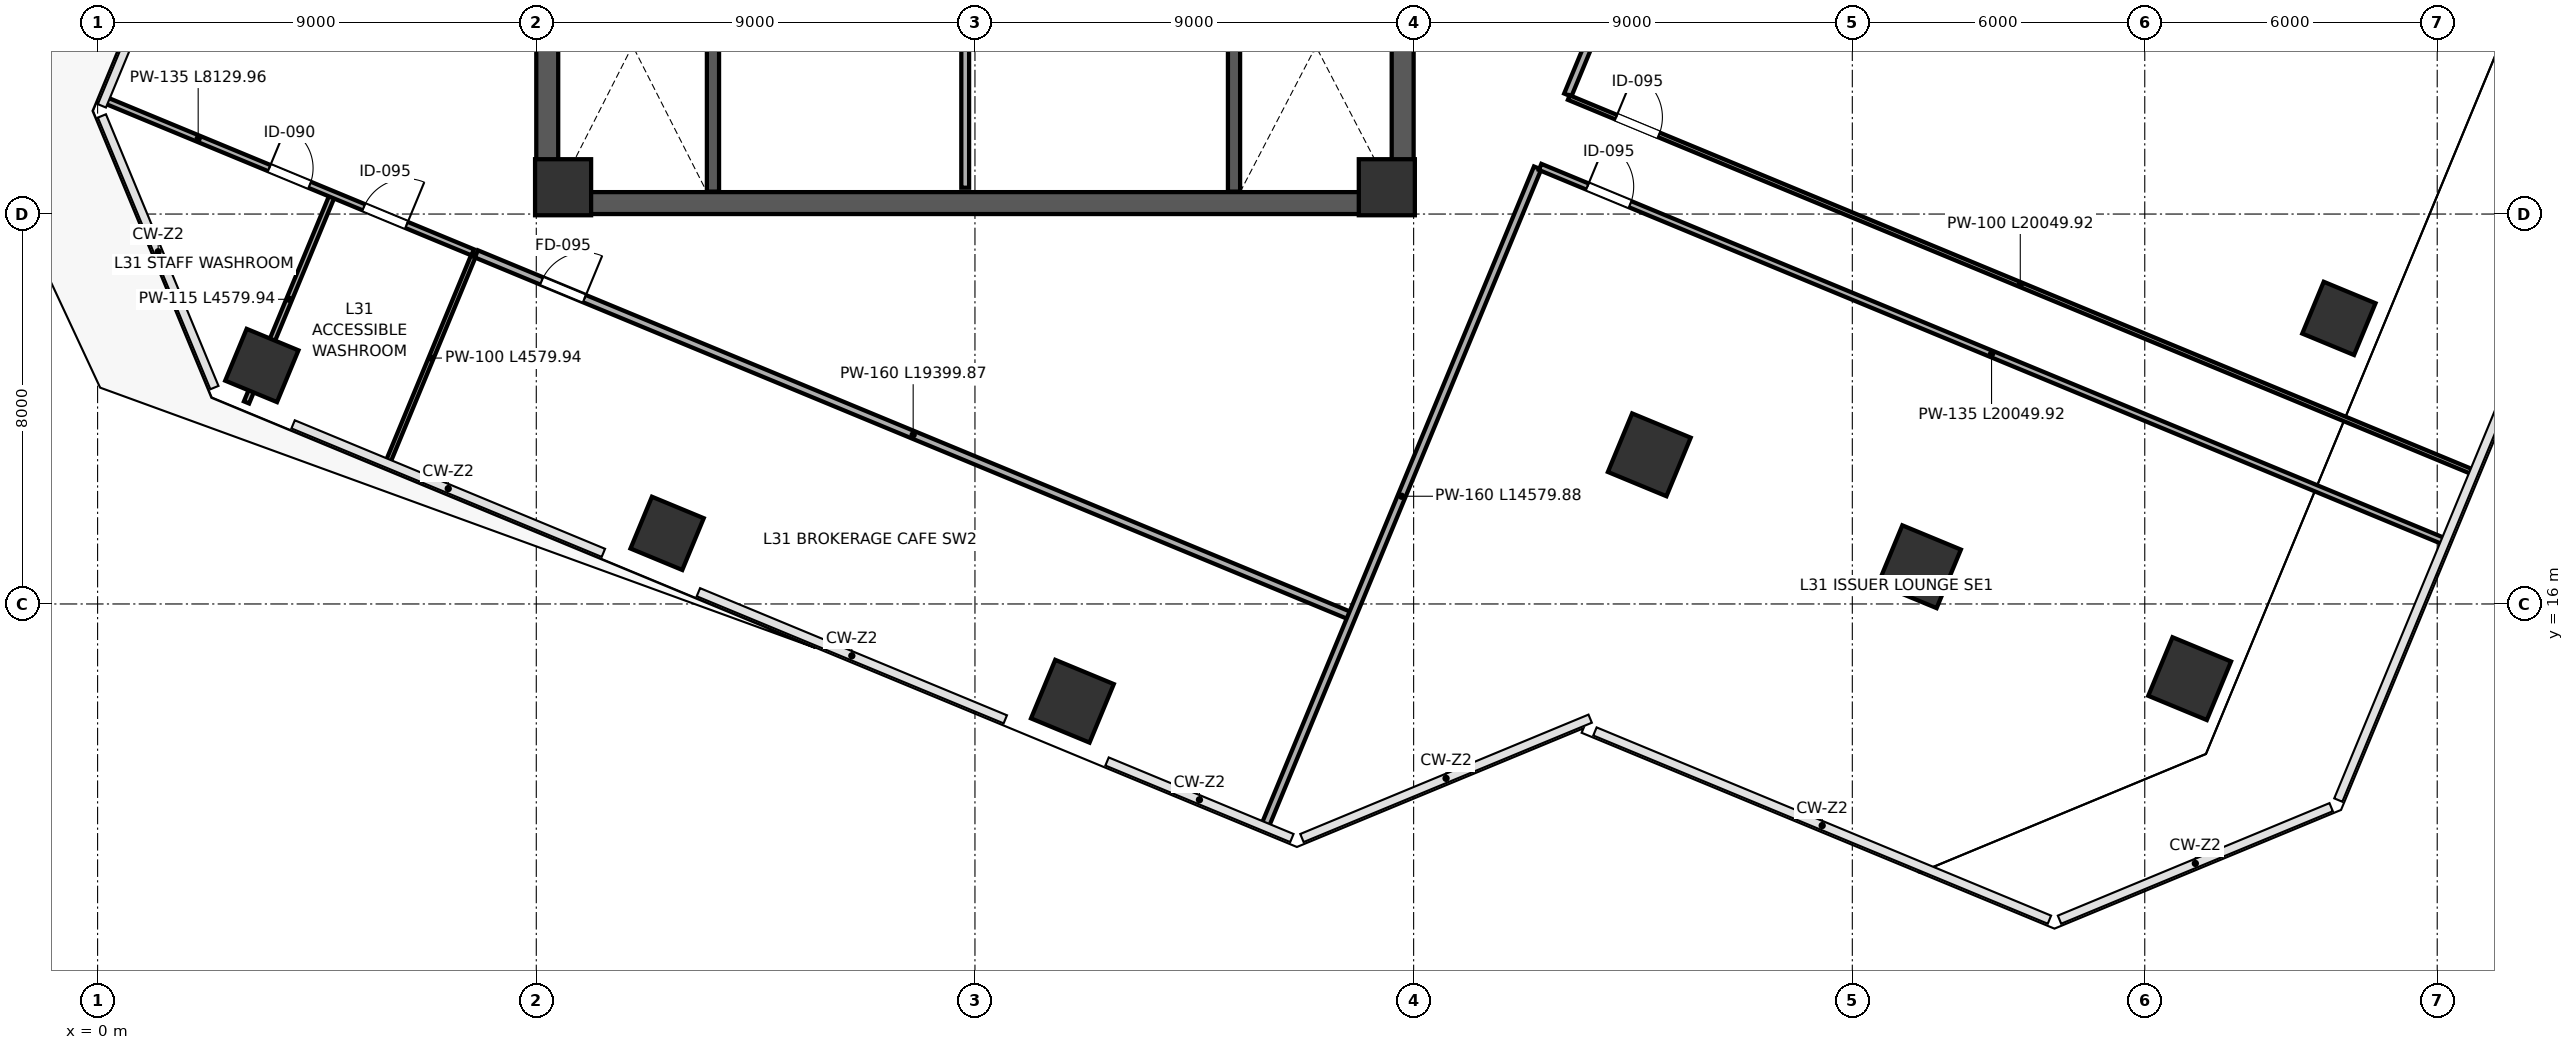
"""IFC4 building model, lengths in metres.
Left out: names, types, materials, properties, quantities, classifications, styles, units other than length and angle.
Written with IfcOpenShell. Run it as: python <this file> out.ifc"""

import sys

from ifc_helpers import new_model, si_unit, direction, frame, frame_2d, origin, origin_2d, place, context, subcontext, project, spatial, rectangle, extrude, source, transform, mapped, element, fill, save


model = new_model("IFC4")
c1 = context("Model", 3, precision=1e-05, world=origin(), true_north=direction((0.0, 1.0)))
c2 = subcontext(c1, "Body", "Model", "MODEL_VIEW")
j1 = project(units=[si_unit("LENGTHUNIT", "METRE"), si_unit("PLANEANGLEUNIT", "RADIAN")], contexts=[c1])
p1 = place(None, origin())
s1 = spatial("IfcSite", under=j1, at=p1, CompositionType="ELEMENT")
p2 = place(p1, origin())
s2 = spatial("IfcBuilding", under=s1, at=p2, CompositionType="ELEMENT")
p3 = place(p2, frame((0.0, 0.0, 141.4)))
s3 = spatial("IfcBuildingStorey", under=s2, at=p3, CompositionType="ELEMENT", Elevation=141.4)
m1 = source(origin(), c2, "Body", "SweptSolid", [
    extrude(rectangle(XDim=1.15, YDim=1.15, at=origin_2d()), origin(), (0.0, 0.0, 1.0), 4.199),
])
for number, where, z_axis, x_axis in (
    (1, (9.55, 24.55, 0.001), (0.0, 0.0, 1.0), (1.0, 0.0, 0.0)),
    (2, (26.45, 24.55, 0.001), (0.0, 0.0, 1.0), (1.0, 0.0, 0.0)),
):
    element("IfcColumn", number, at=place(p3, frame(where, z_axis=z_axis, x_axis=x_axis)), inside=s3, PredefinedType="COLUMN", context=c2, shape_type="MappedRepresentation", body=[
        mapped(m1, transform((0.0, 0.0, 0.0), scale=1.0)),
    ])
m2 = source(origin(), c2, "Body", "SweptSolid", [
    extrude(rectangle(XDim=1.15, YDim=1.15, at=origin_2d()), origin(), (0.0, 0.0, 1.0), 4.199),
])
for number, where, z_axis, x_axis in (
    (3, (3.369, 20.893, 0.001), (0.0, 0.0, 1.0), (-0.924, 0.383, 0.0)),
    (4, (11.684, 17.449, 0.001), (0.0, 0.0, 1.0), (-0.924, 0.383, 0.0)),
):
    element("IfcColumn", number, at=place(p3, frame(where, z_axis=z_axis, x_axis=x_axis)), inside=s3, PredefinedType="COLUMN", context=c2, shape_type="MappedRepresentation", body=[
        mapped(m2, transform((0.0, 0.0, 0.0), scale=1.0)),
    ])
m3 = source(origin(), c2, "Body", "SweptSolid", [
    extrude(rectangle(XDim=1.3, YDim=1.3, at=origin_2d()), origin(), (0.0, 0.0, 1.0), 4.199),
])
p4 = place(p3, frame((19.999, 14.004, 0.001), z_axis=(0.0, 0.0, 1.0), x_axis=(-0.923879532511, 0.382683432365, 0.0)))
e5 = element("IfcColumn", 5, at=p4, inside=s3, PredefinedType="COLUMN", context=c2, shape_type="MappedRepresentation", body=[
    mapped(m3, transform((0.0, 0.0, 0.0), scale=1.0)),
])
m4 = source(origin(), c2, "Body", "SweptSolid", [
    extrude(rectangle(XDim=1.3, YDim=1.3, at=origin_2d()), origin(), (0.0, 0.0, 1.0), 4.199),
])
for number, where, z_axis, x_axis in (
    (6, (31.835, 19.06, 0.001), (0.0, 0.0, 1.0), (-0.924, 0.383, 0.0)),
    (7, (37.378, 16.764, 0.001), (0.0, 0.0, 1.0), (-0.924, 0.383, 0.0)),
):
    element("IfcColumn", number, at=place(p3, frame(where, z_axis=z_axis, x_axis=x_axis)), inside=s3, PredefinedType="COLUMN", context=c2, shape_type="MappedRepresentation", body=[
        mapped(m4, transform((0.0, 0.0, 0.0), scale=1.0)),
    ])
p5 = place(p3, frame((42.921, 14.468, 0.001), z_axis=(0.0, 0.0, 1.0), x_axis=(-0.923879532511, 0.382683432365, 0.0)))
e8 = element("IfcColumn", 8, at=p5, inside=s3, PredefinedType="COLUMN", context=c2, shape_type="MappedRepresentation", body=[
    mapped(m3, transform((0.0, 0.0, 0.0), scale=1.0)),
])
p6 = place(p3, frame((45.983, 21.859, 0.001), z_axis=(0.0, 0.0, 1.0), x_axis=(-0.923879532511, 0.382683432365, 0.0)))
e9 = element("IfcColumn", 9, at=p6, inside=s3, PredefinedType="COLUMN", context=c2, shape_type="MappedRepresentation", body=[
    mapped(m2, transform((0.0, 0.0, 0.0), scale=1.0)),
])
p7 = place(p3, frame((9.225, 24.45, 0.0), z_axis=(0.0, 0.0, 1.0), x_axis=(0.0, 1.0, 0.0)))
e10 = element("IfcWall", 10, at=p7, inside=s3, PredefinedType="SHEAR", context=c2, shape_type="SweptSolid", body=[
    extrude(rectangle(XDim=15.1, YDim=0.45, at=frame_2d((7.55, 0.0))), origin(), (0.0, 0.0, 1.0), 3.96),
])
p8 = place(p3, frame((26.775, 24.45, 0.0), z_axis=(0.0, 0.0, 1.0), x_axis=(0.0, 1.0, 0.0)))
e11 = element("IfcWall", 11, at=p8, inside=s3, PredefinedType="SHEAR", context=c2, shape_type="SweptSolid", body=[
    extrude(rectangle(XDim=15.1, YDim=0.45, at=frame_2d((7.55, 0.0))), origin(), (0.0, 0.0, 1.0), 3.96),
])
p9 = place(p8, frame((8.6, 0.0, 0.0)))
e12 = element("IfcOpeningElement", 12, at=p9, cuts=e11, PredefinedType="OPENING", context=c2, shape_type="SweptSolid", body=[
    extrude(rectangle(XDim=1.15, YDim=2.2, at=frame_2d((0.575, 1.1))), frame((0.0, 0.235, 0.0), z_axis=(0.0, -1.0, 0.0), x_axis=(1.0, 0.0, 0.0)), (0.0, 0.0, 1.0), 0.47),
])
p10 = place(p3, frame((9.0, 24.225, 0.0), z_axis=(0.0, 0.0, 1.0), x_axis=(1.0, 0.0, 0.0)))
e13 = element("IfcWall", 13, at=p10, inside=s3, PredefinedType="SHEAR", context=c2, shape_type="SweptSolid", body=[
    extrude(rectangle(XDim=18.0, YDim=0.45, at=frame_2d((9.0, 0.0))), origin(), (0.0, 0.0, 1.0), 3.96),
])
p11 = place(p3, frame((12.625, 24.46, 0.0), z_axis=(0.0, 0.0, 1.0), x_axis=(0.0, 1.0, 0.0)))
e14 = element("IfcWall", 14, at=p11, inside=s3, PredefinedType="SHEAR", context=c2, shape_type="SweptSolid", body=[
    extrude(rectangle(XDim=7.49, YDim=0.25, at=frame_2d((3.745, 0.0))), origin(), (0.0, 0.0, 1.0), 3.96),
])
p12 = place(p11, frame((5.85, 0.0, 0.0)))
e15 = element("IfcOpeningElement", 15, at=p12, cuts=e14, PredefinedType="OPENING", context=c2, shape_type="SweptSolid", body=[
    extrude(rectangle(XDim=1.15, YDim=2.2, at=frame_2d((0.575, 1.1))), frame((0.0, 0.135, 0.0), z_axis=(0.0, -1.0, 0.0), x_axis=(1.0, 0.0, 0.0)), (0.0, 0.0, 1.0), 0.27),
])
p13 = place(p3, frame((23.315, 24.46, 0.0), z_axis=(0.0, 0.0, 1.0), x_axis=(0.0, 1.0, 0.0)))
e16 = element("IfcWall", 16, at=p13, inside=s3, PredefinedType="SHEAR", context=c2, shape_type="SweptSolid", body=[
    extrude(rectangle(XDim=7.49, YDim=0.25, at=frame_2d((3.745, 0.0))), origin(), (0.0, 0.0, 1.0), 3.96),
])
p14 = place(p3, frame((17.8, 24.54, 0.0), z_axis=(0.0, 0.0, 1.0), x_axis=(0.0, 1.0, 0.0)))
e17 = element("IfcWall", 17, at=p14, inside=s3, PredefinedType="PARTITIONING", context=c2, shape_type="SweptSolid", body=[
    extrude(rectangle(XDim=4.6, YDim=0.16, at=frame_2d((2.3, 0.0))), origin(), (0.0, 0.0, 1.0), 3.96),
])
p15 = place(p3, frame((3.055, 20.135, 0.0), z_axis=(0.0, 0.0, 1.0), x_axis=(0.382676631985, 0.923882349292, 0.0)))
e18 = element("IfcWall", 18, at=p15, inside=s3, PredefinedType="PARTITIONING", context=c2, shape_type="SweptSolid", body=[
    extrude(rectangle(XDim=4.58, YDim=0.115, at=frame_2d((2.29, 0.0))), origin(), (0.0, 0.0, 1.0), 3.195),
])
p16 = place(p3, frame((5.966, 18.93, 0.0), z_axis=(0.0, 0.0, 1.0), x_axis=(0.382676631985, 0.923882349292, 0.0)))
e19 = element("IfcWall", 19, at=p16, inside=s3, PredefinedType="PARTITIONING", context=c2, shape_type="SweptSolid", body=[
    extrude(rectangle(XDim=4.58, YDim=0.1, at=frame_2d((2.29, 0.0))), origin(), (0.0, 0.0, 1.0), 3.195),
])
p17 = place(p3, frame((0.186, 26.325, 0.0), z_axis=(0.0, 0.0, 1.0), x_axis=(0.923871890562, -0.382701881142, 0.0)))
e20 = element("IfcWall", 20, at=p17, inside=s3, PredefinedType="PARTITIONING", context=c2, shape_type="SweptSolid", body=[
    extrude(rectangle(XDim=8.13, YDim=0.135, at=frame_2d((4.065, 0.0))), origin(), (0.0, 0.0, 1.0), 3.96),
])
p18 = place(p17, frame((3.61, 0.0, 0.0)))
e21 = element("IfcOpeningElement", 21, at=p18, cuts=e20, PredefinedType="OPENING", context=c2, shape_type="SweptSolid", body=[
    extrude(rectangle(XDim=0.9, YDim=2.15, at=frame_2d((0.45, 1.075))), frame((0.0, 0.078, 0.0), z_axis=(0.0, -1.0, 0.0), x_axis=(1.0, 0.0, 0.0)), (0.0, 0.0, 1.0), 0.155),
])
p19 = place(p17, frame((5.71, 0.0, 0.0)))
e22 = element("IfcOpeningElement", 22, at=p19, cuts=e20, PredefinedType="OPENING", context=c2, shape_type="SweptSolid", body=[
    extrude(rectangle(XDim=0.95, YDim=2.15, at=frame_2d((0.475, 1.075))), frame((0.0, 0.078, 0.0), z_axis=(0.0, -1.0, 0.0), x_axis=(1.0, 0.0, 0.0)), (0.0, 0.0, 1.0), 0.155),
])
p20 = place(p3, frame((7.771, 23.183, 0.0), z_axis=(0.0, 0.0, 1.0), x_axis=(0.923878020857, -0.382687081801, 0.0)))
e23 = element("IfcWall", 23, at=p20, inside=s3, PredefinedType="PARTITIONING", context=c2, shape_type="SweptSolid", body=[
    extrude(rectangle(XDim=19.4, YDim=0.16, at=frame_2d((9.7, 0.0))), origin(), (0.0, 0.0, 1.0), 3.96),
])
p21 = place(p20, frame((1.45, 0.0, 0.0)))
e24 = element("IfcOpeningElement", 24, at=p21, cuts=e23, PredefinedType="OPENING", context=c2, shape_type="SweptSolid", body=[
    extrude(rectangle(XDim=0.95, YDim=2.15, at=frame_2d((0.475, 1.075))), frame((0.0, 0.09, 0.0), z_axis=(0.0, -1.0, 0.0), x_axis=(1.0, 0.0, 0.0)), (0.0, 0.0, 1.0), 0.18),
])
p22 = place(p3, frame((30.162, 26.442, 0.0), z_axis=(0.0, 0.0, 1.0), x_axis=(0.382688600046, 0.923877391971, 0.0)))
e25 = element("IfcWall", 25, at=p22, inside=s3, PredefinedType="PARTITIONING", context=c2, shape_type="SweptSolid", body=[
    extrude(rectangle(XDim=17.84, YDim=0.16, at=frame_2d((8.92, 0.0))), origin(), (0.0, 0.0, 1.0), 3.195),
])
p23 = place(p3, frame((23.963, 11.475, 0.0), z_axis=(0.0, 0.0, 1.0), x_axis=(0.382686018031, 0.923878461489, 0.0)))
e26 = element("IfcWall", 26, at=p23, inside=s3, PredefinedType="PARTITIONING", context=c2, shape_type="SweptSolid", body=[
    extrude(rectangle(XDim=14.58, YDim=0.16, at=frame_2d((7.29, 0.0))), origin(), (0.0, 0.0, 1.0), 3.96),
])
p24 = place(p3, frame((30.184, 26.39, 0.0), z_axis=(0.0, 0.0, 1.0), x_axis=(0.923877920754, -0.382687323468, 0.0)))
e27 = element("IfcWall", 27, at=p24, inside=s3, PredefinedType="PARTITIONING", context=c2, shape_type="SweptSolid", body=[
    extrude(rectangle(XDim=20.05, YDim=0.1, at=frame_2d((10.025, 0.0))), origin(), (0.0, 0.0, 1.0), 3.253),
])
p25 = place(p24, frame((1.05, 0.0, 0.0)))
e28 = element("IfcOpeningElement", 28, at=p25, cuts=e27, PredefinedType="OPENING", context=c2, shape_type="SweptSolid", body=[
    extrude(rectangle(XDim=0.95, YDim=2.15, at=frame_2d((0.475, 1.075))), frame((0.0, 0.06, 0.0), z_axis=(0.0, -1.0, 0.0), x_axis=(1.0, 0.0, 0.0)), (0.0, 0.0, 1.0), 0.12),
])
p26 = place(p3, frame((29.595, 24.967, 0.0), z_axis=(0.0, 0.0, 1.0), x_axis=(0.923882225843, -0.382676930022, 0.0)))
e29 = element("IfcWall", 29, at=p26, inside=s3, PredefinedType="PARTITIONING", context=c2, shape_type="SweptSolid", body=[
    extrude(rectangle(XDim=20.05, YDim=0.135, at=frame_2d((10.025, 0.0))), origin(), (0.0, 0.0, 1.0), 3.253),
])
p27 = place(p26, frame((1.05, 0.0, 0.0)))
e30 = element("IfcOpeningElement", 30, at=p27, cuts=e29, PredefinedType="OPENING", context=c2, shape_type="SweptSolid", body=[
    extrude(rectangle(XDim=0.95, YDim=2.15, at=frame_2d((0.475, 1.075))), frame((0.0, 0.078, 0.0), z_axis=(0.0, -1.0, 0.0), x_axis=(1.0, 0.0, 0.0)), (0.0, 0.0, 1.0), 0.155),
])
m5 = source(origin(), c2, "Body", "SweptSolid", [
    extrude(rectangle(XDim=0.9, YDim=2.15, at=frame_2d((0.45, 1.075))), frame((0.0, 0.025, 0.0), z_axis=(0.0, -1.0, 0.0), x_axis=(1.0, 0.0, 0.0)), (0.0, 0.0, 1.0), 0.05),
])
p28 = place(p18, origin())
e31 = element("IfcDoor", 31, at=p28, inside=s3, OperationType="SINGLE_SWING_LEFT", PredefinedType="DOOR", context=c2, shape_type="MappedRepresentation", body=[
    mapped(m5, transform((0.0, 0.0, 0.0), scale=1.0)),
])
fill(e21, e31)
m6 = source(origin(), c2, "Body", "SweptSolid", [
    extrude(rectangle(XDim=0.95, YDim=2.15, at=frame_2d((0.475, 1.075))), frame((0.0, 0.025, 0.0), z_axis=(0.0, -1.0, 0.0), x_axis=(1.0, 0.0, 0.0)), (0.0, 0.0, 1.0), 0.05),
])
p29 = place(p19, origin())
e32 = element("IfcDoor", 32, at=p29, inside=s3, OperationType="SINGLE_SWING_RIGHT", PredefinedType="DOOR", context=c2, shape_type="MappedRepresentation", body=[
    mapped(m6, transform((0.0, 0.0, 0.0), scale=1.0)),
])
fill(e22, e32)
m7 = source(origin(), c2, "Body", "SweptSolid", [
    extrude(rectangle(XDim=0.95, YDim=2.15, at=frame_2d((0.475, 1.075))), frame((0.0, 0.025, 0.0), z_axis=(0.0, -1.0, 0.0), x_axis=(1.0, 0.0, 0.0)), (0.0, 0.0, 1.0), 0.05),
])
p30 = place(p21, origin())
e33 = element("IfcDoor", 33, at=p30, inside=s3, OperationType="SINGLE_SWING_RIGHT", PredefinedType="DOOR", context=c2, shape_type="MappedRepresentation", body=[
    mapped(m7, transform((0.0, 0.0, 0.0), scale=1.0)),
])
fill(e24, e33)
p31 = place(p25, origin())
e34 = element("IfcDoor", 34, at=p31, inside=s3, OperationType="SINGLE_SWING_LEFT", PredefinedType="DOOR", context=c2, shape_type="MappedRepresentation", body=[
    mapped(m6, transform((0.0, 0.0, 0.0), scale=1.0)),
])
fill(e28, e34)
p32 = place(p27, origin())
e35 = element("IfcDoor", 35, at=p32, inside=s3, OperationType="SINGLE_SWING_LEFT", PredefinedType="DOOR", context=c2, shape_type="MappedRepresentation", body=[
    mapped(m6, transform((0.0, 0.0, 0.0), scale=1.0)),
])
fill(e30, e35)
save(model, sys.argv[1])
